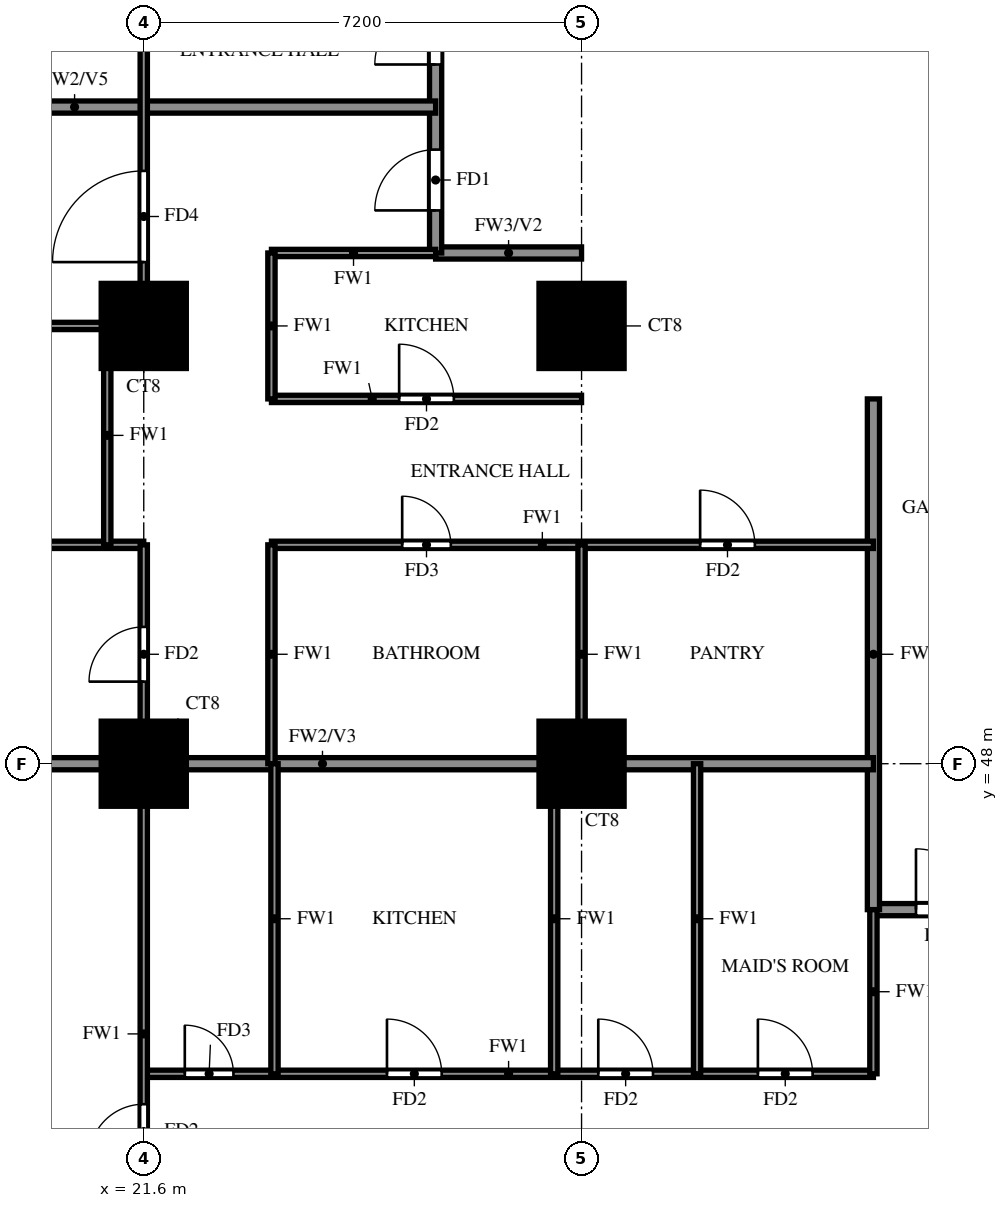
"""IFC4 building model, lengths in metres.
Left out: names, types, materials, properties, quantities, classifications, styles, units other than length and angle.
Written with IfcOpenShell. Run it as: python <this file> out.ifc"""

import sys

from ifc_helpers import new_model, si_unit, direction, frame, frame_2d, origin, origin_2d, place, context, subcontext, project, spatial, rectangle, extrude, source, transform, mapped, element, fill, save


model = new_model("IFC4")
c1 = context("Model", 3, precision=1e-05, world=origin(), true_north=direction((0.0, 1.0)))
c2 = subcontext(c1, "Body", "Model", "MODEL_VIEW")
j1 = project(units=[si_unit("LENGTHUNIT", "METRE"), si_unit("PLANEANGLEUNIT", "RADIAN")], contexts=[c1])
p1 = place(None, origin())
s1 = spatial("IfcSite", under=j1, at=p1, CompositionType="ELEMENT")
p2 = place(p1, origin())
s2 = spatial("IfcBuilding", under=s1, at=p2, CompositionType="ELEMENT")
p3 = place(p2, frame((0.0, 0.0, 55.0)))
s3 = spatial("IfcBuildingStorey", under=s2, at=p3, CompositionType="ELEMENT", Elevation=55.0)
m1 = source(origin(), c2, "Body", "SweptSolid", [
    extrude(rectangle(XDim=1.4, YDim=1.4, at=origin_2d()), origin(), (0.0, 0.0, 1.0), 3.18),
])
for number, where, z_axis, x_axis in (
    (1, (21.6, 48.0, 0.0), (0.0, 0.0, 1.0), (1.0, 0.0, 0.0)),
    (2, (28.8, 48.0, 0.0), (0.0, 0.0, 1.0), (1.0, 0.0, 0.0)),
    (3, (21.6, 55.2, 0.0), (0.0, 0.0, 1.0), (1.0, 0.0, 0.0)),
    (4, (28.8, 55.2, 0.0), (0.0, 0.0, 1.0), (1.0, 0.0, 0.0)),
):
    element("IfcColumn", number, at=place(p3, frame(where, z_axis=z_axis, x_axis=x_axis)), inside=s3, PredefinedType="COLUMN", context=c2, shape_type="MappedRepresentation", body=[
        mapped(m1, transform((0.0, 0.0, 0.0))),
    ])
p4 = place(p3, frame((33.6, 45.6, 0.0), z_axis=(0.0, 0.0, 1.0), x_axis=(1.0, 0.0, 0.0)))
e5 = element("IfcWall", 5, at=p4, inside=s3, PredefinedType="SOLIDWALL", context=c2, shape_type="SweptSolid", body=[
    extrude(rectangle(XDim=7.2, YDim=0.2, at=frame_2d((3.6, 0.0))), origin(), (0.0, 0.0, 1.0), 3.18),
])
p5 = place(p4, frame((0.7, 0.0, 0.0)))
e6 = element("IfcOpeningElement", 6, at=p5, cuts=e5, PredefinedType="OPENING", context=c2, shape_type="SweptSolid", body=[
    extrude(rectangle(XDim=1.0, YDim=2.1, at=frame_2d((0.5, 1.05))), frame((0.0, 0.11, 0.0), z_axis=(0.0, -1.0, 0.0), x_axis=(1.0, 0.0, 0.0)), (0.0, 0.0, 1.0), 0.22),
])
p6 = place(p3, frame((26.4, 56.4, 0.0), z_axis=(0.0, 0.0, 1.0), x_axis=(1.0, 0.0, 0.0)))
e7 = element("IfcWall", 7, at=p6, inside=s3, PredefinedType="SOLIDWALL", context=c2, shape_type="SweptSolid", body=[
    extrude(rectangle(XDim=2.4, YDim=0.2, at=frame_2d((1.2, 0.0))), origin(), (0.0, 0.0, 1.0), 3.18),
])
p7 = place(p3, frame((26.4, 56.4, 0.0), z_axis=(0.0, 0.0, 1.0), x_axis=(0.0, 1.0, 0.0)))
e8 = element("IfcWall", 8, at=p7, inside=s3, PredefinedType="SOLIDWALL", context=c2, shape_type="SweptSolid", body=[
    extrude(rectangle(XDim=9.6, YDim=0.2, at=frame_2d((4.8, 0.0))), origin(), (0.0, 0.0, 1.0), 3.18),
])
p8 = place(p7, frame((0.7, 0.0, 0.0)))
e9 = element("IfcOpeningElement", 9, at=p8, cuts=e8, PredefinedType="OPENING", context=c2, shape_type="SweptSolid", body=[
    extrude(rectangle(XDim=1.0, YDim=2.1, at=frame_2d((0.5, 1.05))), frame((0.0, 0.11, 0.0), z_axis=(0.0, -1.0, 0.0), x_axis=(1.0, 0.0, 0.0)), (0.0, 0.0, 1.0), 0.22),
])
p9 = place(p7, frame((3.1, 0.0, 0.0)))
e10 = element("IfcOpeningElement", 10, at=p9, cuts=e8, PredefinedType="OPENING", context=c2, shape_type="SweptSolid", body=[
    extrude(rectangle(XDim=1.0, YDim=2.1, at=frame_2d((0.5, 1.05))), frame((0.0, 0.11, 0.0), z_axis=(0.0, -1.0, 0.0), x_axis=(1.0, 0.0, 0.0)), (0.0, 0.0, 1.0), 0.22),
])
p10 = place(p3, frame((33.6, 45.6, 0.0), z_axis=(0.0, 0.0, 1.0), x_axis=(0.0, 1.0, 0.0)))
e11 = element("IfcWall", 11, at=p10, inside=s3, PredefinedType="SOLIDWALL", context=c2, shape_type="SweptSolid", body=[
    extrude(rectangle(XDim=8.4, YDim=0.2, at=frame_2d((4.2, 0.0))), origin(), (0.0, 0.0, 1.0), 3.18),
])
p11 = place(p3, frame((14.525, 48.0, 0.0), z_axis=(0.0, 0.0, 1.0), x_axis=(1.0, 0.0, 0.0)))
e12 = element("IfcWall", 12, at=p11, inside=s3, PredefinedType="SOLIDWALL", context=c2, shape_type="SweptSolid", body=[
    extrude(rectangle(XDim=19.075, YDim=0.2, at=frame_2d((9.538, 0.0))), origin(), (0.0, 0.0, 1.0), 3.18),
])
p12 = place(p3, frame((14.525, 58.8, 0.0), z_axis=(0.0, 0.0, 1.0), x_axis=(1.0, 0.0, 0.0)))
e13 = element("IfcWall", 13, at=p12, inside=s3, PredefinedType="SOLIDWALL", context=c2, shape_type="SweptSolid", body=[
    extrude(rectangle(XDim=11.875, YDim=0.2, at=frame_2d((5.938, 0.0))), origin(), (0.0, 0.0, 1.0), 2.28),
])
p13 = place(p3, frame((21.6, 42.9, 0.0), z_axis=(0.0, 0.0, 1.0), x_axis=(1.0, 0.0, 0.0)))
e14 = element("IfcWall", 14, at=p13, inside=s3, PredefinedType="PARTITIONING", context=c2, shape_type="SweptSolid", body=[
    extrude(rectangle(XDim=12.0, YDim=0.12, at=frame_2d((6.0, 0.0))), origin(), (0.0, 0.0, 1.0), 3.18),
])
p14 = place(p13, frame((0.675, 0.0, 0.0)))
e15 = element("IfcOpeningElement", 15, at=p14, cuts=e14, PredefinedType="OPENING", context=c2, shape_type="SweptSolid", body=[
    extrude(rectangle(XDim=0.8, YDim=2.1, at=frame_2d((0.4, 1.05))), frame((0.0, 0.07, 0.0), z_axis=(0.0, -1.0, 0.0), x_axis=(1.0, 0.0, 0.0)), (0.0, 0.0, 1.0), 0.14),
])
p15 = place(p13, frame((4.0, 0.0, 0.0)))
e16 = element("IfcOpeningElement", 16, at=p15, cuts=e14, PredefinedType="OPENING", context=c2, shape_type="SweptSolid", body=[
    extrude(rectangle(XDim=0.9, YDim=2.1, at=frame_2d((0.45, 1.05))), frame((0.0, 0.07, 0.0), z_axis=(0.0, -1.0, 0.0), x_axis=(1.0, 0.0, 0.0)), (0.0, 0.0, 1.0), 0.14),
])
p16 = place(p13, frame((7.475, 0.0, 0.0)))
e17 = element("IfcOpeningElement", 17, at=p16, cuts=e14, PredefinedType="OPENING", context=c2, shape_type="SweptSolid", body=[
    extrude(rectangle(XDim=0.9, YDim=2.1, at=frame_2d((0.45, 1.05))), frame((0.0, 0.07, 0.0), z_axis=(0.0, -1.0, 0.0), x_axis=(1.0, 0.0, 0.0)), (0.0, 0.0, 1.0), 0.14),
])
p17 = place(p13, frame((10.1, 0.0, 0.0)))
e18 = element("IfcOpeningElement", 18, at=p17, cuts=e14, PredefinedType="OPENING", context=c2, shape_type="SweptSolid", body=[
    extrude(rectangle(XDim=0.9, YDim=2.1, at=frame_2d((0.45, 1.05))), frame((0.0, 0.07, 0.0), z_axis=(0.0, -1.0, 0.0), x_axis=(1.0, 0.0, 0.0)), (0.0, 0.0, 1.0), 0.14),
])
p18 = place(p3, frame((14.525, 51.6, 0.0), z_axis=(0.0, 0.0, 1.0), x_axis=(1.0, 0.0, 0.0)))
e19 = element("IfcWall", 19, at=p18, inside=s3, PredefinedType="PARTITIONING", context=c2, shape_type="SweptSolid", body=[
    extrude(rectangle(XDim=7.075, YDim=0.12, at=frame_2d((3.538, 0.0))), origin(), (0.0, 0.0, 1.0), 2.28),
])
p19 = place(p18, frame((2.837, 0.0, 0.0)))
e20 = element("IfcOpeningElement", 20, at=p19, cuts=e19, PredefinedType="OPENING", context=c2, shape_type="SweptSolid", body=[
    extrude(rectangle(XDim=0.8, YDim=2.1, at=frame_2d((0.4, 1.05))), frame((0.0, 0.07, 0.0), z_axis=(0.0, -1.0, 0.0), x_axis=(1.0, 0.0, 0.0)), (0.0, 0.0, 1.0), 0.14),
])
p20 = place(p3, frame((23.7, 51.6, 0.0), z_axis=(0.0, 0.0, 1.0), x_axis=(1.0, 0.0, 0.0)))
e21 = element("IfcWall", 21, at=p20, inside=s3, PredefinedType="PARTITIONING", context=c2, shape_type="SweptSolid", body=[
    extrude(rectangle(XDim=9.9, YDim=0.12, at=frame_2d((4.95, 0.0))), origin(), (0.0, 0.0, 1.0), 3.18),
])
p21 = place(p20, frame((2.15, 0.0, 0.0)))
e22 = element("IfcOpeningElement", 22, at=p21, cuts=e21, PredefinedType="OPENING", context=c2, shape_type="SweptSolid", body=[
    extrude(rectangle(XDim=0.8, YDim=2.1, at=frame_2d((0.4, 1.05))), frame((0.0, 0.07, 0.0), z_axis=(0.0, -1.0, 0.0), x_axis=(1.0, 0.0, 0.0)), (0.0, 0.0, 1.0), 0.14),
])
p22 = place(p20, frame((7.05, 0.0, 0.0)))
e23 = element("IfcOpeningElement", 23, at=p22, cuts=e21, PredefinedType="OPENING", context=c2, shape_type="SweptSolid", body=[
    extrude(rectangle(XDim=0.9, YDim=2.1, at=frame_2d((0.45, 1.05))), frame((0.0, 0.07, 0.0), z_axis=(0.0, -1.0, 0.0), x_axis=(1.0, 0.0, 0.0)), (0.0, 0.0, 1.0), 0.14),
])
p23 = place(p3, frame((23.7, 54.0, 0.0), z_axis=(0.0, 0.0, 1.0), x_axis=(1.0, 0.0, 0.0)))
e24 = element("IfcWall", 24, at=p23, inside=s3, PredefinedType="PARTITIONING", context=c2, shape_type="SweptSolid", body=[
    extrude(rectangle(XDim=5.1, YDim=0.12, at=frame_2d((2.55, 0.0))), origin(), (0.0, 0.0, 1.0), 3.18),
])
p24 = place(p23, frame((2.1, 0.0, 0.0)))
e25 = element("IfcOpeningElement", 25, at=p24, cuts=e24, PredefinedType="OPENING", context=c2, shape_type="SweptSolid", body=[
    extrude(rectangle(XDim=0.9, YDim=2.1, at=frame_2d((0.45, 1.05))), frame((0.0, 0.07, 0.0), z_axis=(0.0, -1.0, 0.0), x_axis=(1.0, 0.0, 0.0)), (0.0, 0.0, 1.0), 0.14),
])
p25 = place(p3, frame((14.525, 55.2, 0.0), z_axis=(0.0, 0.0, 1.0), x_axis=(1.0, 0.0, 0.0)))
e26 = element("IfcWall", 26, at=p25, inside=s3, PredefinedType="PARTITIONING", context=c2, shape_type="SweptSolid", body=[
    extrude(rectangle(XDim=7.075, YDim=0.12, at=frame_2d((3.538, 0.0))), origin(), (0.0, 0.0, 1.0), 3.18),
])
p26 = place(p3, frame((23.7, 56.4, 0.0), z_axis=(0.0, 0.0, 1.0), x_axis=(1.0, 0.0, 0.0)))
e27 = element("IfcWall", 27, at=p26, inside=s3, PredefinedType="PARTITIONING", context=c2, shape_type="SweptSolid", body=[
    extrude(rectangle(XDim=2.7, YDim=0.12, at=frame_2d((1.35, 0.0))), origin(), (0.0, 0.0, 1.0), 3.18),
])
p27 = place(p3, frame((21.0, 51.6, 0.0), z_axis=(0.0, 0.0, 1.0), x_axis=(0.0, 1.0, 0.0)))
e28 = element("IfcWall", 28, at=p27, inside=s3, PredefinedType="PARTITIONING", context=c2, shape_type="SweptSolid", body=[
    extrude(rectangle(XDim=3.6, YDim=0.12, at=frame_2d((1.8, 0.0))), origin(), (0.0, 0.0, 1.0), 3.18),
])
p28 = place(p3, frame((21.6, 33.725, 0.0), z_axis=(0.0, 0.0, 1.0), x_axis=(0.0, 1.0, 0.0)))
e29 = element("IfcWall", 29, at=p28, inside=s3, PredefinedType="PARTITIONING", context=c2, shape_type="SweptSolid", body=[
    extrude(rectangle(XDim=17.875, YDim=0.12, at=frame_2d((8.938, 0.0))), origin(), (0.0, 0.0, 1.0), 3.18),
])
p29 = place(p28, frame((7.775, 0.0, 0.0)))
e30 = element("IfcOpeningElement", 30, at=p29, cuts=e29, PredefinedType="OPENING", context=c2, shape_type="SweptSolid", body=[
    extrude(rectangle(XDim=0.9, YDim=2.1, at=frame_2d((0.45, 1.05))), frame((0.0, 0.07, 0.0), z_axis=(0.0, -1.0, 0.0), x_axis=(1.0, 0.0, 0.0)), (0.0, 0.0, 1.0), 0.14),
])
p30 = place(p28, frame((15.625, 0.0, 0.0)))
e31 = element("IfcOpeningElement", 31, at=p30, cuts=e29, PredefinedType="OPENING", context=c2, shape_type="SweptSolid", body=[
    extrude(rectangle(XDim=0.9, YDim=2.1, at=frame_2d((0.45, 1.05))), frame((0.0, 0.07, 0.0), z_axis=(0.0, -1.0, 0.0), x_axis=(1.0, 0.0, 0.0)), (0.0, 0.0, 1.0), 0.14),
])
p31 = place(p3, frame((21.6, 55.2, 0.0), z_axis=(0.0, 0.0, 1.0), x_axis=(0.0, 1.0, 0.0)))
e32 = element("IfcWall", 32, at=p31, inside=s3, PredefinedType="PARTITIONING", context=c2, shape_type="SweptSolid", body=[
    extrude(rectangle(XDim=14.4, YDim=0.12, at=frame_2d((7.2, 0.0))), origin(), (0.0, 0.0, 1.0), 3.18),
])
p32 = place(p31, frame((1.05, 0.0, 0.0)))
e33 = element("IfcOpeningElement", 33, at=p32, cuts=e32, PredefinedType="OPENING", context=c2, shape_type="SweptSolid", body=[
    extrude(rectangle(XDim=1.5, YDim=2.1, at=frame_2d((0.75, 1.05))), frame((0.0, 0.07, 0.0), z_axis=(0.0, -1.0, 0.0), x_axis=(1.0, 0.0, 0.0)), (0.0, 0.0, 1.0), 0.14),
])
p33 = place(p31, frame((4.95, 0.0, 0.0)))
e34 = element("IfcOpeningElement", 34, at=p33, cuts=e32, PredefinedType="OPENING", context=c2, shape_type="SweptSolid", body=[
    extrude(rectangle(XDim=0.9, YDim=2.1, at=frame_2d((0.45, 1.05))), frame((0.0, 0.07, 0.0), z_axis=(0.0, -1.0, 0.0), x_axis=(1.0, 0.0, 0.0)), (0.0, 0.0, 1.0), 0.14),
])
p34 = place(p31, frame((10.35, 0.0, 0.0)))
e35 = element("IfcOpeningElement", 35, at=p34, cuts=e32, PredefinedType="OPENING", context=c2, shape_type="SweptSolid", body=[
    extrude(rectangle(XDim=0.9, YDim=2.1, at=frame_2d((0.45, 1.05))), frame((0.0, 0.07, 0.0), z_axis=(0.0, -1.0, 0.0), x_axis=(1.0, 0.0, 0.0)), (0.0, 0.0, 1.0), 0.14),
])
p35 = place(p3, frame((23.7, 48.0, 0.0), z_axis=(0.0, 0.0, 1.0), x_axis=(0.0, 1.0, 0.0)))
e36 = element("IfcWall", 36, at=p35, inside=s3, PredefinedType="PARTITIONING", context=c2, shape_type="SweptSolid", body=[
    extrude(rectangle(XDim=3.6, YDim=0.12, at=frame_2d((1.8, 0.0))), origin(), (0.0, 0.0, 1.0), 3.18),
])
p36 = place(p3, frame((23.7, 54.0, 0.0), z_axis=(0.0, 0.0, 1.0), x_axis=(0.0, 1.0, 0.0)))
e37 = element("IfcWall", 37, at=p36, inside=s3, PredefinedType="PARTITIONING", context=c2, shape_type="SweptSolid", body=[
    extrude(rectangle(XDim=2.4, YDim=0.12, at=frame_2d((1.2, 0.0))), origin(), (0.0, 0.0, 1.0), 3.18),
])
for number, where, z_axis, x_axis in (
    (38, (23.75, 42.9, 0.0), (0.0, 0.0, 1.0), (0.0, 1.0, 0.0)),
    (39, (28.35, 42.9, 0.0), (0.0, 0.0, 1.0), (0.0, 1.0, 0.0)),
):
    element("IfcWall", number, at=place(p3, frame(where, z_axis=z_axis, x_axis=x_axis)), inside=s3, PredefinedType="PARTITIONING", context=c2, shape_type="SweptSolid", body=[
        extrude(rectangle(XDim=5.1, YDim=0.12, at=frame_2d((2.55, 0.0))), origin(), (0.0, 0.0, 1.0), 3.18),
    ])
p37 = place(p3, frame((28.8, 48.0, 0.0), z_axis=(0.0, 0.0, 1.0), x_axis=(0.0, 1.0, 0.0)))
e40 = element("IfcWall", 40, at=p37, inside=s3, PredefinedType="PARTITIONING", context=c2, shape_type="SweptSolid", body=[
    extrude(rectangle(XDim=3.6, YDim=0.12, at=frame_2d((1.8, 0.0))), origin(), (0.0, 0.0, 1.0), 3.18),
])
p38 = place(p3, frame((30.7, 42.9, 0.0), z_axis=(0.0, 0.0, 1.0), x_axis=(0.0, 1.0, 0.0)))
e41 = element("IfcWall", 41, at=p38, inside=s3, PredefinedType="PARTITIONING", context=c2, shape_type="SweptSolid", body=[
    extrude(rectangle(XDim=5.1, YDim=0.12, at=frame_2d((2.55, 0.0))), origin(), (0.0, 0.0, 1.0), 3.18),
])
p39 = place(p3, frame((33.6, 42.9, 0.0), z_axis=(0.0, 0.0, 1.0), x_axis=(0.0, 1.0, 0.0)))
e42 = element("IfcWall", 42, at=p39, inside=s3, PredefinedType="PARTITIONING", context=c2, shape_type="SweptSolid", body=[
    extrude(rectangle(XDim=2.7, YDim=0.12, at=frame_2d((1.35, 0.0))), origin(), (0.0, 0.0, 1.0), 3.18),
])
p40 = place(p5, origin())
e43 = element("IfcDoor", 43, at=p40, inside=s3, OperationType="SINGLE_SWING_LEFT", PredefinedType="DOOR", context=c2, shape_type="SweptSolid", body=[
    extrude(rectangle(XDim=1.0, YDim=2.1, at=frame_2d((0.5, 1.05))), frame((0.0, 0.025, 0.0), z_axis=(0.0, -1.0, 0.0), x_axis=(1.0, 0.0, 0.0)), (0.0, 0.0, 1.0), 0.05),
])
fill(e6, e43)
p41 = place(p29, origin())
e44 = element("IfcDoor", 44, at=p41, inside=s3, OperationType="SINGLE_SWING_RIGHT", PredefinedType="DOOR", context=c2, shape_type="SweptSolid", body=[
    extrude(rectangle(XDim=0.9, YDim=2.1, at=frame_2d((0.45, 1.05))), frame((0.0, 0.025, 0.0), z_axis=(0.0, -1.0, 0.0), x_axis=(1.0, 0.0, 0.0)), (0.0, 0.0, 1.0), 0.05),
])
fill(e30, e44)
p42 = place(p14, origin())
e45 = element("IfcDoor", 45, at=p42, inside=s3, OperationType="SINGLE_SWING_LEFT", PredefinedType="DOOR", context=c2, shape_type="SweptSolid", body=[
    extrude(rectangle(XDim=0.8, YDim=2.1, at=frame_2d((0.4, 1.05))), frame((0.0, 0.025, 0.0), z_axis=(0.0, -1.0, 0.0), x_axis=(1.0, 0.0, 0.0)), (0.0, 0.0, 1.0), 0.05),
])
fill(e15, e45)
p43 = place(p15, origin())
e46 = element("IfcDoor", 46, at=p43, inside=s3, OperationType="SINGLE_SWING_RIGHT", PredefinedType="DOOR", context=c2, shape_type="SweptSolid", body=[
    extrude(rectangle(XDim=0.9, YDim=2.1, at=frame_2d((0.45, 1.05))), frame((0.0, 0.025, 0.0), z_axis=(0.0, -1.0, 0.0), x_axis=(1.0, 0.0, 0.0)), (0.0, 0.0, 1.0), 0.05),
])
fill(e16, e46)
p44 = place(p16, origin())
e47 = element("IfcDoor", 47, at=p44, inside=s3, OperationType="SINGLE_SWING_LEFT", PredefinedType="DOOR", context=c2, shape_type="SweptSolid", body=[
    extrude(rectangle(XDim=0.9, YDim=2.1, at=frame_2d((0.45, 1.05))), frame((0.0, 0.025, 0.0), z_axis=(0.0, -1.0, 0.0), x_axis=(1.0, 0.0, 0.0)), (0.0, 0.0, 1.0), 0.05),
])
fill(e17, e47)
p45 = place(p17, origin())
e48 = element("IfcDoor", 48, at=p45, inside=s3, OperationType="SINGLE_SWING_LEFT", PredefinedType="DOOR", context=c2, shape_type="SweptSolid", body=[
    extrude(rectangle(XDim=0.9, YDim=2.1, at=frame_2d((0.45, 1.05))), frame((0.0, 0.025, 0.0), z_axis=(0.0, -1.0, 0.0), x_axis=(1.0, 0.0, 0.0)), (0.0, 0.0, 1.0), 0.05),
])
fill(e18, e48)
p46 = place(p8, origin())
e49 = element("IfcDoor", 49, at=p46, inside=s3, OperationType="SINGLE_SWING_LEFT", PredefinedType="DOOR", context=c2, shape_type="SweptSolid", body=[
    extrude(rectangle(XDim=1.0, YDim=2.1, at=frame_2d((0.5, 1.05))), frame((0.0, 0.025, 0.0), z_axis=(0.0, -1.0, 0.0), x_axis=(1.0, 0.0, 0.0)), (0.0, 0.0, 1.0), 0.05),
])
fill(e9, e49)
p47 = place(p30, origin())
e50 = element("IfcDoor", 50, at=p47, inside=s3, OperationType="SINGLE_SWING_RIGHT", PredefinedType="DOOR", context=c2, shape_type="SweptSolid", body=[
    extrude(rectangle(XDim=0.9, YDim=2.1, at=frame_2d((0.45, 1.05))), frame((0.0, 0.025, 0.0), z_axis=(0.0, -1.0, 0.0), x_axis=(1.0, 0.0, 0.0)), (0.0, 0.0, 1.0), 0.05),
])
fill(e31, e50)
p48 = place(p32, origin())
e51 = element("IfcDoor", 51, at=p48, inside=s3, OperationType="SINGLE_SWING_LEFT", PredefinedType="DOOR", context=c2, shape_type="SweptSolid", body=[
    extrude(rectangle(XDim=1.5, YDim=2.1, at=frame_2d((0.75, 1.05))), frame((0.0, 0.025, 0.0), z_axis=(0.0, -1.0, 0.0), x_axis=(1.0, 0.0, 0.0)), (0.0, 0.0, 1.0), 0.05),
])
fill(e33, e51)
p49 = place(p21, origin())
e52 = element("IfcDoor", 52, at=p49, inside=s3, OperationType="SINGLE_SWING_RIGHT", PredefinedType="DOOR", context=c2, shape_type="SweptSolid", body=[
    extrude(rectangle(XDim=0.8, YDim=2.1, at=frame_2d((0.4, 1.05))), frame((0.0, 0.025, 0.0), z_axis=(0.0, -1.0, 0.0), x_axis=(1.0, 0.0, 0.0)), (0.0, 0.0, 1.0), 0.05),
])
fill(e22, e52)
p50 = place(p24, origin())
e53 = element("IfcDoor", 53, at=p50, inside=s3, OperationType="SINGLE_SWING_LEFT", PredefinedType="DOOR", context=c2, shape_type="SweptSolid", body=[
    extrude(rectangle(XDim=0.9, YDim=2.1, at=frame_2d((0.45, 1.05))), frame((0.0, 0.025, 0.0), z_axis=(0.0, -1.0, 0.0), x_axis=(1.0, 0.0, 0.0)), (0.0, 0.0, 1.0), 0.05),
])
fill(e25, e53)
p51 = place(p22, origin())
e54 = element("IfcDoor", 54, at=p51, inside=s3, OperationType="SINGLE_SWING_LEFT", PredefinedType="DOOR", context=c2, shape_type="SweptSolid", body=[
    extrude(rectangle(XDim=0.9, YDim=2.1, at=frame_2d((0.45, 1.05))), frame((0.0, 0.025, 0.0), z_axis=(0.0, -1.0, 0.0), x_axis=(1.0, 0.0, 0.0)), (0.0, 0.0, 1.0), 0.05),
])
fill(e23, e54)
p52 = place(p9, origin())
e55 = element("IfcDoor", 55, at=p52, inside=s3, OperationType="SINGLE_SWING_LEFT", PredefinedType="DOOR", context=c2, shape_type="SweptSolid", body=[
    extrude(rectangle(XDim=1.0, YDim=2.1, at=frame_2d((0.5, 1.05))), frame((0.0, 0.025, 0.0), z_axis=(0.0, -1.0, 0.0), x_axis=(1.0, 0.0, 0.0)), (0.0, 0.0, 1.0), 0.05),
])
fill(e10, e55)
save(model, sys.argv[1])
